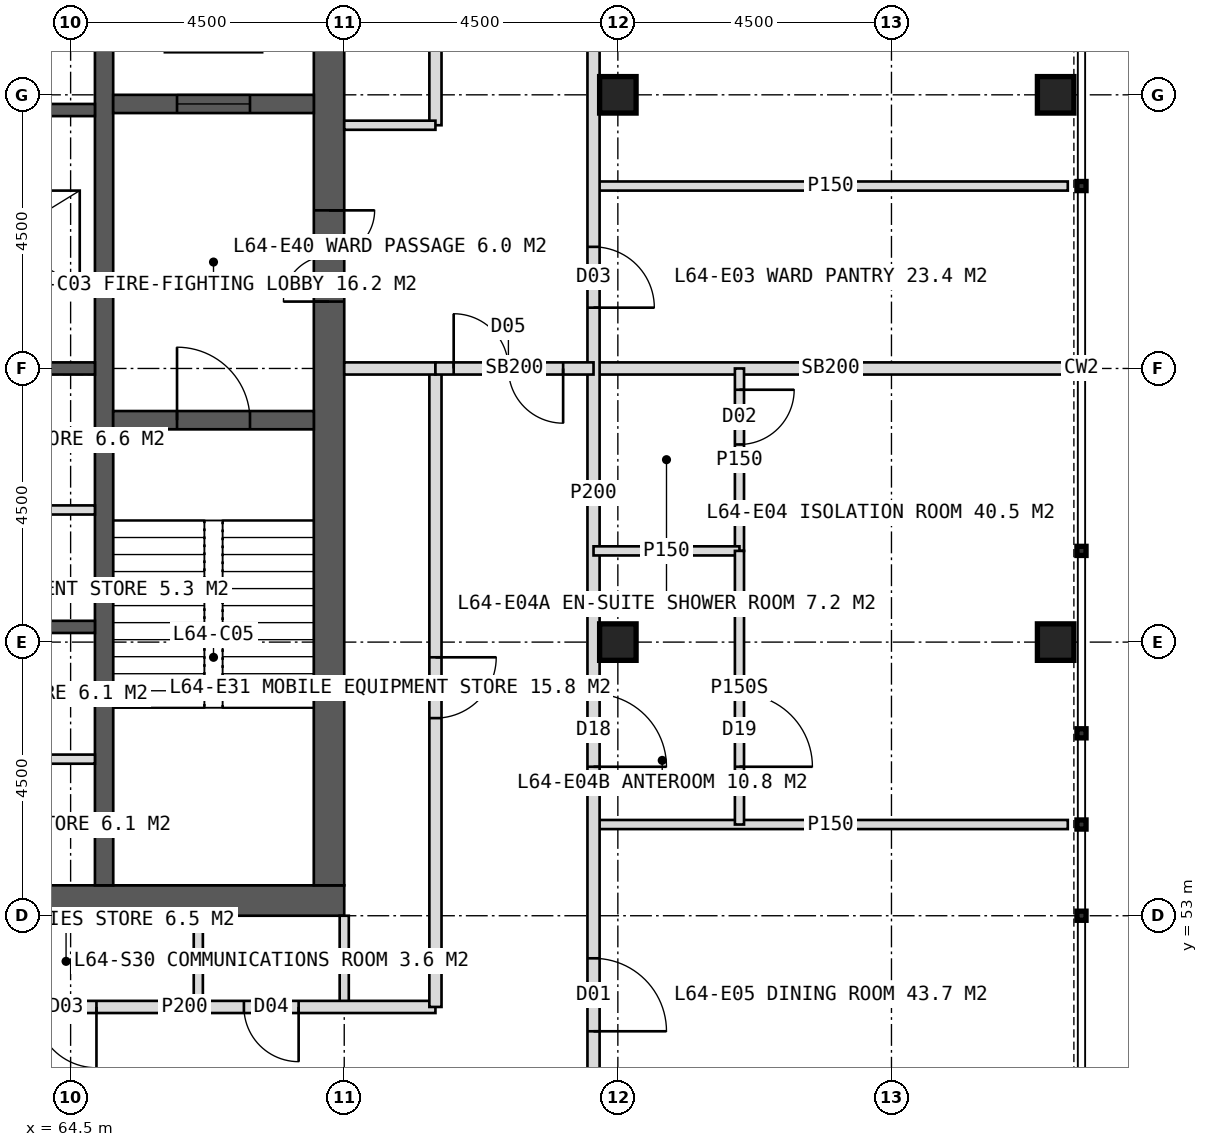
"""IFC4 building model, lengths in metres.
Left out: names, types, materials, properties, quantities, classifications, styles, units other than length and angle.
Written with IfcOpenShell. Run it as: python <this file> out.ifc"""

import sys

from ifc_helpers import new_model, si_unit, direction, frame, frame_2d, origin, origin_2d, place, context, subcontext, project, spatial, rectangle, hollow_rectangle, extrude, element, fill, save


model = new_model("IFC4")
c1 = context("Model", 3, precision=1e-05, world=origin(), true_north=direction((0.0, 1.0)))
c2 = subcontext(c1, "Body", "Model", "MODEL_VIEW")
j1 = project(units=[si_unit("LENGTHUNIT", "METRE"), si_unit("PLANEANGLEUNIT", "RADIAN")], contexts=[c1])
p1 = place(None, origin())
s1 = spatial("IfcSite", under=j1, at=p1, CompositionType="ELEMENT")
p2 = place(p1, origin())
s2 = spatial("IfcBuilding", under=s1, at=p2, CompositionType="ELEMENT")
p3 = place(p2, frame((0.0, 0.0, 266.0)))
s3 = spatial("IfcBuildingStorey", under=s2, at=p3, CompositionType="ELEMENT", Elevation=266.0)
p4 = place(p3, frame((51.0, 53.25, 0.0), z_axis=(0.0, 0.0, 1.0), x_axis=(1.0, 0.0, 0.0)))
e1 = element("IfcWall", 1, at=p4, inside=s3, PredefinedType="SHEAR", context=c2, shape_type="SweptSolid", body=[
    extrude(rectangle(XDim=18.0, YDim=0.5, at=frame_2d((9.0, 0.0))), origin(), (0.0, 0.0, 1.0), 4.0),
])
p5 = place(p4, frame((8.1, 0.0, 0.0)))
e2 = element("IfcOpeningElement", 2, at=p5, cuts=e1, PredefinedType="OPENING", context=c2, shape_type="SweptSolid", body=[
    extrude(rectangle(XDim=1.8, YDim=2.2, at=frame_2d((0.9, 1.1))), frame((0.0, 0.26, 0.0), z_axis=(0.0, -1.0, 0.0), x_axis=(1.0, 0.0, 0.0)), (0.0, 0.0, 1.0), 0.52),
])
p6 = place(p3, frame((68.75, 53.5, 0.0), z_axis=(0.0, 0.0, 1.0), x_axis=(0.0, 1.0, 0.0)))
e3 = element("IfcWall", 3, at=p6, inside=s3, PredefinedType="SHEAR", context=c2, shape_type="SweptSolid", body=[
    extrude(rectangle(XDim=17.0, YDim=0.5, at=frame_2d((8.5, 0.0))), origin(), (0.0, 0.0, 1.0), 4.0),
])
p7 = place(p6, frame((9.6, 0.0, 0.0)))
e4 = element("IfcOpeningElement", 4, at=p7, cuts=e3, PredefinedType="OPENING", context=c2, shape_type="SweptSolid", body=[
    extrude(rectangle(XDim=1.5, YDim=2.2, at=frame_2d((0.75, 1.1))), frame((0.0, 0.26, 0.0), z_axis=(0.0, -1.0, 0.0), x_axis=(1.0, 0.0, 0.0)), (0.0, 0.0, 1.0), 0.52),
])
p8 = place(p3, frame((65.05, 53.5, 0.0), z_axis=(0.0, 0.0, 1.0), x_axis=(0.0, 1.0, 0.0)))
e5 = element("IfcWall", 5, at=p8, inside=s3, PredefinedType="SHEAR", context=c2, shape_type="SweptSolid", body=[
    extrude(rectangle(XDim=17.0, YDim=0.3, at=frame_2d((8.5, 0.0))), origin(), (0.0, 0.0, 1.0), 4.0),
])
for number, where, z_axis, x_axis in (
    (6, (61.85, 57.75, 0.0), (0.0, 0.0, 1.0), (1.0, 0.0, 0.0)),
    (7, (61.85, 62.0, 0.0), (0.0, 0.0, 1.0), (1.0, 0.0, 0.0)),
    (8, (61.85, 66.25, 0.0), (0.0, 0.0, 1.0), (1.0, 0.0, 0.0)),
):
    element("IfcWall", number, at=place(p3, frame(where, z_axis=z_axis, x_axis=x_axis)), inside=s3, PredefinedType="SHEAR", context=c2, shape_type="SweptSolid", body=[
        extrude(rectangle(XDim=3.05, YDim=0.2, at=frame_2d((1.525, 0.0))), origin(), (0.0, 0.0, 1.0), 4.0),
    ])
p9 = place(p3, frame((65.2, 61.15, 0.0), z_axis=(0.0, 0.0, 1.0), x_axis=(1.0, 0.0, 0.0)))
e9 = element("IfcWall", 9, at=p9, inside=s3, PredefinedType="SHEAR", context=c2, shape_type="SweptSolid", body=[
    extrude(rectangle(XDim=3.3, YDim=0.3, at=frame_2d((1.65, 0.0))), origin(), (0.0, 0.0, 1.0), 4.0),
])
p10 = place(p9, frame((1.05, 0.0, 0.0)))
e10 = element("IfcOpeningElement", 10, at=p10, cuts=e9, PredefinedType="OPENING", context=c2, shape_type="SweptSolid", body=[
    extrude(rectangle(XDim=1.2, YDim=2.1, at=frame_2d((0.6, 1.05))), frame((0.0, 0.16, 0.0), z_axis=(0.0, -1.0, 0.0), x_axis=(1.0, 0.0, 0.0)), (0.0, 0.0, 1.0), 0.32),
])
p11 = place(p3, frame((65.2, 66.35, 0.0), z_axis=(0.0, 0.0, 1.0), x_axis=(1.0, 0.0, 0.0)))
e11 = element("IfcWall", 11, at=p11, inside=s3, PredefinedType="SHEAR", context=c2, shape_type="SweptSolid", body=[
    extrude(rectangle(XDim=3.3, YDim=0.3, at=frame_2d((1.65, 0.0))), origin(), (0.0, 0.0, 1.0), 4.0),
])
p12 = place(p11, frame((1.05, 0.0, 0.0)))
e12 = element("IfcOpeningElement", 12, at=p12, cuts=e11, PredefinedType="OPENING", context=c2, shape_type="SweptSolid", body=[
    extrude(rectangle(XDim=1.2, YDim=2.2, at=frame_2d((0.6, 1.1))), frame((0.0, 0.16, 0.0), z_axis=(0.0, -1.0, 0.0), x_axis=(1.0, 0.0, 0.0)), (0.0, 0.0, 1.0), 0.32),
])
for number, where, z_axis, x_axis in (
    (13, (73.5, 57.5, 0.0), (0.0, 0.0, 1.0), (1.0, 0.0, 0.0)),
    (14, (73.5, 66.5, 0.0), (0.0, 0.0, 1.0), (1.0, 0.0, 0.0)),
    (15, (80.7, 57.5, 0.0), (0.0, 0.0, 1.0), (1.0, 0.0, 0.0)),
    (16, (80.7, 66.5, 0.0), (0.0, 0.0, 1.0), (1.0, 0.0, 0.0)),
):
    element("IfcColumn", number, at=place(p3, frame(where, z_axis=z_axis, x_axis=x_axis)), inside=s3, PredefinedType="COLUMN", context=c2, shape_type="SweptSolid", body=[
        extrude(hollow_rectangle(XDim=0.6, YDim=0.6, WallThickness=0.04, at=origin_2d()), origin(), (0.0, 0.0, 1.0), 4.0),
    ])
p13 = place(p3, frame((69.0, 53.0, 0.0), z_axis=(0.0, 0.0, 1.0), x_axis=(0.0, -1.0, 0.0)))
e17 = element("IfcWall", 17, at=p13, inside=s3, PredefinedType="PARTITIONING", context=c2, shape_type="SweptSolid", body=[
    extrude(rectangle(XDim=1.5, YDim=0.15, at=frame_2d((0.75, 0.0))), origin(), (0.0, 0.0, 1.0), 3.75),
])
p14 = place(p3, frame((70.5, 51.5, 0.0), z_axis=(0.0, 0.0, 1.0), x_axis=(-1.0, 0.0, 0.0)))
e18 = element("IfcWall", 18, at=p14, inside=s3, PredefinedType="PARTITIONING", context=c2, shape_type="SweptSolid", body=[
    extrude(rectangle(XDim=8.25, YDim=0.2, at=frame_2d((4.125, 0.0))), origin(), (0.0, 0.0, 1.0), 3.75),
])
p15 = place(p14, frame((2.25, 0.0, 0.0)))
e19 = element("IfcOpeningElement", 19, at=p15, cuts=e18, PredefinedType="OPENING", context=c2, shape_type="SweptSolid", body=[
    extrude(rectangle(XDim=0.9, YDim=2.1, at=frame_2d((0.45, 1.05))), frame((0.0, 0.11, 0.0), z_axis=(0.0, -1.0, 0.0), x_axis=(1.0, 0.0, 0.0)), (0.0, 0.0, 1.0), 0.22),
])
p16 = place(p14, frame((5.575, 0.0, 0.0)))
e20 = element("IfcOpeningElement", 20, at=p16, cuts=e18, PredefinedType="OPENING", context=c2, shape_type="SweptSolid", body=[
    extrude(rectangle(XDim=1.0, YDim=2.1, at=frame_2d((0.5, 1.05))), frame((0.0, 0.11, 0.0), z_axis=(0.0, -1.0, 0.0), x_axis=(1.0, 0.0, 0.0)), (0.0, 0.0, 1.0), 0.22),
])
p17 = place(p3, frame((66.6, 53.0, 0.0), z_axis=(0.0, 0.0, 1.0), x_axis=(0.0, -1.0, 0.0)))
e21 = element("IfcWall", 21, at=p17, inside=s3, PredefinedType="PARTITIONING", context=c2, shape_type="SweptSolid", body=[
    extrude(rectangle(XDim=1.5, YDim=0.15, at=frame_2d((0.75, 0.0))), origin(), (0.0, 0.0, 1.0), 3.75),
])
p18 = place(p3, frame((73.1, 65.0, 0.0), z_axis=(0.0, 0.0, 1.0), x_axis=(1.0, 0.0, 0.0)))
e22 = element("IfcWall", 22, at=p18, inside=s3, PredefinedType="PARTITIONING", context=c2, shape_type="SweptSolid", body=[
    extrude(rectangle(XDim=7.8, YDim=0.15, at=frame_2d((3.9, 0.0))), origin(), (0.0, 0.0, 1.0), 3.75),
])
p19 = place(p3, frame((73.1, 62.0, 0.0), z_axis=(0.0, 0.0, 1.0), x_axis=(1.0, 0.0, 0.0)))
e23 = element("IfcWall", 23, at=p19, inside=s3, PredefinedType="SOLIDWALL", context=c2, shape_type="SweptSolid", body=[
    extrude(rectangle(XDim=7.8, YDim=0.2, at=frame_2d((3.9, 0.0))), origin(), (0.0, 0.0, 1.0), 2.75),
])
p20 = place(p3, frame((73.1, 54.5, 0.0), z_axis=(0.0, 0.0, 1.0), x_axis=(1.0, 0.0, 0.0)))
e24 = element("IfcWall", 24, at=p20, inside=s3, PredefinedType="PARTITIONING", context=c2, shape_type="SweptSolid", body=[
    extrude(rectangle(XDim=7.8, YDim=0.15, at=frame_2d((3.9, 0.0))), origin(), (0.0, 0.0, 1.0), 3.75),
])
p21 = place(p3, frame((73.1, 71.0, 0.0), z_axis=(0.0, 0.0, 1.0), x_axis=(0.0, -1.0, 0.0)))
e25 = element("IfcWall", 25, at=p21, inside=s3, PredefinedType="PARTITIONING", context=c2, shape_type="SweptSolid", body=[
    extrude(rectangle(XDim=22.1, YDim=0.2, at=frame_2d((11.05, 0.0))), origin(), (0.0, 0.0, 1.0), 3.75),
])
p22 = place(p21, frame((2.65, 0.0, 0.0)))
e26 = element("IfcOpeningElement", 26, at=p22, cuts=e25, PredefinedType="OPENING", context=c2, shape_type="SweptSolid", body=[
    extrude(rectangle(XDim=1.0, YDim=2.1, at=frame_2d((0.5, 1.05))), frame((0.0, 0.11, 0.0), z_axis=(0.0, -1.0, 0.0), x_axis=(1.0, 0.0, 0.0)), (0.0, 0.0, 1.0), 0.22),
])
p23 = place(p21, frame((7.0, 0.0, 0.0)))
e27 = element("IfcOpeningElement", 27, at=p23, cuts=e25, PredefinedType="OPENING", context=c2, shape_type="SweptSolid", body=[
    extrude(rectangle(XDim=1.0, YDim=2.1, at=frame_2d((0.5, 1.05))), frame((0.0, 0.11, 0.0), z_axis=(0.0, -1.0, 0.0), x_axis=(1.0, 0.0, 0.0)), (0.0, 0.0, 1.0), 0.22),
])
p24 = place(p21, frame((14.35, 0.0, 0.0)))
e28 = element("IfcOpeningElement", 28, at=p24, cuts=e25, PredefinedType="OPENING", context=c2, shape_type="SweptSolid", body=[
    extrude(rectangle(XDim=1.2, YDim=2.2, at=frame_2d((0.6, 1.1))), frame((0.0, 0.11, 0.0), z_axis=(0.0, -1.0, 0.0), x_axis=(1.0, 0.0, 0.0)), (0.0, 0.0, 1.0), 0.22),
])
p25 = place(p21, frame((18.7, 0.0, 0.0)))
e29 = element("IfcOpeningElement", 29, at=p25, cuts=e25, PredefinedType="OPENING", context=c2, shape_type="SweptSolid", body=[
    extrude(rectangle(XDim=1.2, YDim=2.2, at=frame_2d((0.6, 1.1))), frame((0.0, 0.11, 0.0), z_axis=(0.0, -1.0, 0.0), x_axis=(1.0, 0.0, 0.0)), (0.0, 0.0, 1.0), 0.22),
])
p26 = place(p3, frame((75.5, 62.0, 0.0), z_axis=(0.0, 0.0, 1.0), x_axis=(0.0, -1.0, 0.0)))
e30 = element("IfcWall", 30, at=p26, inside=s3, PredefinedType="PARTITIONING", context=c2, shape_type="SweptSolid", body=[
    extrude(rectangle(XDim=3.0, YDim=0.15, at=frame_2d((1.5, 0.0))), origin(), (0.0, 0.0, 1.0), 3.75),
])
p27 = place(p26, frame((0.35, 0.0, 0.0)))
e31 = element("IfcOpeningElement", 31, at=p27, cuts=e30, PredefinedType="OPENING", context=c2, shape_type="SweptSolid", body=[
    extrude(rectangle(XDim=0.9, YDim=2.1, at=frame_2d((0.45, 1.05))), frame((0.0, 0.085, 0.0), z_axis=(0.0, -1.0, 0.0), x_axis=(1.0, 0.0, 0.0)), (0.0, 0.0, 1.0), 0.17),
])
p28 = place(p3, frame((73.1, 59.0, 0.0), z_axis=(0.0, 0.0, 1.0), x_axis=(1.0, 0.0, 0.0)))
e32 = element("IfcWall", 32, at=p28, inside=s3, PredefinedType="PARTITIONING", context=c2, shape_type="SweptSolid", body=[
    extrude(rectangle(XDim=2.4, YDim=0.15, at=frame_2d((1.2, 0.0))), origin(), (0.0, 0.0, 1.0), 3.75),
])
p29 = place(p3, frame((75.5, 59.0, 0.0), z_axis=(0.0, 0.0, 1.0), x_axis=(0.0, -1.0, 0.0)))
e33 = element("IfcWall", 33, at=p29, inside=s3, PredefinedType="PARTITIONING", context=c2, shape_type="SweptSolid", body=[
    extrude(rectangle(XDim=4.5, YDim=0.15, at=frame_2d((2.25, 0.0))), origin(), (0.0, 0.0, 1.0), 3.75),
])
p30 = place(p29, frame((2.35, 0.0, 0.0)))
e34 = element("IfcOpeningElement", 34, at=p30, cuts=e33, PredefinedType="OPENING", context=c2, shape_type="SweptSolid", body=[
    extrude(rectangle(XDim=1.2, YDim=2.2, at=frame_2d((0.6, 1.1))), frame((0.0, 0.085, 0.0), z_axis=(0.0, -1.0, 0.0), x_axis=(1.0, 0.0, 0.0)), (0.0, 0.0, 1.0), 0.17),
])
p31 = place(p3, frame((70.5, 71.0, 0.0), z_axis=(0.0, 0.0, 1.0), x_axis=(0.0, -1.0, 0.0)))
e35 = element("IfcWall", 35, at=p31, inside=s3, PredefinedType="PARTITIONING", context=c2, shape_type="SweptSolid", body=[
    extrude(rectangle(XDim=5.0, YDim=0.2, at=frame_2d((2.5, 0.0))), origin(), (0.0, 0.0, 1.0), 3.75),
])
p32 = place(p31, frame((2.0, 0.0, 0.0)))
e36 = element("IfcOpeningElement", 36, at=p32, cuts=e35, PredefinedType="OPENING", context=c2, shape_type="SweptSolid", body=[
    extrude(rectangle(XDim=1.0, YDim=2.1, at=frame_2d((0.5, 1.05))), frame((0.0, 0.11, 0.0), z_axis=(0.0, -1.0, 0.0), x_axis=(1.0, 0.0, 0.0)), (0.0, 0.0, 1.0), 0.22),
])
p33 = place(p3, frame((70.5, 62.0, 0.0), z_axis=(0.0, 0.0, 1.0), x_axis=(0.0, -1.0, 0.0)))
e37 = element("IfcWall", 37, at=p33, inside=s3, PredefinedType="PARTITIONING", context=c2, shape_type="SweptSolid", body=[
    extrude(rectangle(XDim=10.5, YDim=0.2, at=frame_2d((5.25, 0.0))), origin(), (0.0, 0.0, 1.0), 3.75),
])
p34 = place(p33, frame((4.75, 0.0, 0.0)))
e38 = element("IfcOpeningElement", 38, at=p34, cuts=e37, PredefinedType="OPENING", context=c2, shape_type="SweptSolid", body=[
    extrude(rectangle(XDim=1.0, YDim=2.1, at=frame_2d((0.5, 1.05))), frame((0.0, 0.11, 0.0), z_axis=(0.0, -1.0, 0.0), x_axis=(1.0, 0.0, 0.0)), (0.0, 0.0, 1.0), 0.22),
])
p35 = place(p3, frame((69.0, 66.0, 0.0), z_axis=(0.0, 0.0, 1.0), x_axis=(1.0, 0.0, 0.0)))
e39 = element("IfcWall", 39, at=p35, inside=s3, PredefinedType="PARTITIONING", context=c2, shape_type="SweptSolid", body=[
    extrude(rectangle(XDim=1.5, YDim=0.15, at=frame_2d((0.75, 0.0))), origin(), (0.0, 0.0, 1.0), 3.75),
])
p36 = place(p3, frame((69.0, 62.0, 0.0), z_axis=(0.0, 0.0, 1.0), x_axis=(1.0, 0.0, 0.0)))
e40 = element("IfcWall", 40, at=p36, inside=s3, PredefinedType="SOLIDWALL", context=c2, shape_type="SweptSolid", body=[
    extrude(rectangle(XDim=1.5, YDim=0.2, at=frame_2d((0.75, 0.0))), origin(), (0.0, 0.0, 1.0), 2.75),
])
p37 = place(p3, frame((70.5, 62.0, 0.0), z_axis=(0.0, 0.0, 1.0), x_axis=(1.0, 0.0, 0.0)))
e41 = element("IfcWall", 41, at=p37, inside=s3, PredefinedType="SOLIDWALL", context=c2, shape_type="SweptSolid", body=[
    extrude(rectangle(XDim=2.6, YDim=0.2, at=frame_2d((1.3, 0.0))), origin(), (0.0, 0.0, 1.0), 2.75),
])
p38 = place(p37, frame((0.3, 0.0, 0.0)))
e42 = element("IfcOpeningElement", 42, at=p38, cuts=e41, PredefinedType="OPENING", context=c2, shape_type="SweptSolid", body=[
    extrude(rectangle(XDim=1.8, YDim=2.2, at=frame_2d((0.9, 1.1))), frame((0.0, 0.11, 0.0), z_axis=(0.0, -1.0, 0.0), x_axis=(1.0, 0.0, 0.0)), (0.0, 0.0, 1.0), 0.22),
])
for number, where, z_axis, x_axis in (
    (43, (61.85, 55.575, 0.0), (0.0, 0.0, 1.0), (1.0, 0.0, 0.0)),
    (44, (61.85, 59.673, 0.0), (0.0, 0.0, 1.0), (1.0, 0.0, 0.0)),
):
    element("IfcWall", number, at=place(p3, frame(where, z_axis=z_axis, x_axis=x_axis)), inside=s3, PredefinedType="PARTITIONING", context=c2, shape_type="SweptSolid", body=[
        extrude(rectangle(XDim=3.05, YDim=0.15, at=frame_2d((1.525, 0.0))), origin(), (0.0, 0.0, 1.0), 3.75),
    ])
p39 = place(p15, origin())
e45 = element("IfcDoor", 45, at=p39, inside=s3, OperationType="SINGLE_SWING_LEFT", PredefinedType="DOOR", context=c2, shape_type="SweptSolid", body=[
    extrude(rectangle(XDim=0.9, YDim=2.1, at=frame_2d((0.45, 1.05))), frame((0.0, 0.025, 0.0), z_axis=(0.0, -1.0, 0.0), x_axis=(1.0, 0.0, 0.0)), (0.0, 0.0, 1.0), 0.05),
])
fill(e19, e45)
p40 = place(p16, origin())
e46 = element("IfcDoor", 46, at=p40, inside=s3, OperationType="SINGLE_SWING_LEFT", PredefinedType="DOOR", context=c2, shape_type="SweptSolid", body=[
    extrude(rectangle(XDim=1.0, YDim=2.1, at=frame_2d((0.5, 1.05))), frame((0.0, 0.025, 0.0), z_axis=(0.0, -1.0, 0.0), x_axis=(1.0, 0.0, 0.0)), (0.0, 0.0, 1.0), 0.05),
])
fill(e20, e46)
p41 = place(p23, origin())
e47 = element("IfcDoor", 47, at=p41, inside=s3, OperationType="SINGLE_SWING_RIGHT", PredefinedType="DOOR", context=c2, shape_type="SweptSolid", body=[
    extrude(rectangle(XDim=1.0, YDim=2.1, at=frame_2d((0.5, 1.05))), frame((0.0, 0.025, 0.0), z_axis=(0.0, -1.0, 0.0), x_axis=(1.0, 0.0, 0.0)), (0.0, 0.0, 1.0), 0.05),
])
fill(e27, e47)
p42 = place(p30, origin())
e48 = element("IfcDoor", 48, at=p42, inside=s3, OperationType="SINGLE_SWING_RIGHT", PredefinedType="DOOR", context=c2, shape_type="SweptSolid", body=[
    extrude(rectangle(XDim=1.2, YDim=2.2, at=frame_2d((0.6, 1.1))), frame((0.0, 0.025, 0.0), z_axis=(0.0, -1.0, 0.0), x_axis=(1.0, 0.0, 0.0)), (0.0, 0.0, 1.0), 0.05),
])
fill(e34, e48)
p43 = place(p24, origin())
e49 = element("IfcDoor", 49, at=p43, inside=s3, OperationType="SINGLE_SWING_RIGHT", PredefinedType="DOOR", context=c2, shape_type="SweptSolid", body=[
    extrude(rectangle(XDim=1.2, YDim=2.2, at=frame_2d((0.6, 1.1))), frame((0.0, 0.025, 0.0), z_axis=(0.0, -1.0, 0.0), x_axis=(1.0, 0.0, 0.0)), (0.0, 0.0, 1.0), 0.05),
])
fill(e28, e49)
p44 = place(p27, origin())
e50 = element("IfcDoor", 50, at=p44, inside=s3, OperationType="SINGLE_SWING_LEFT", PredefinedType="DOOR", context=c2, shape_type="SweptSolid", body=[
    extrude(rectangle(XDim=0.9, YDim=2.1, at=frame_2d((0.45, 1.05))), frame((0.0, 0.025, 0.0), z_axis=(0.0, -1.0, 0.0), x_axis=(1.0, 0.0, 0.0)), (0.0, 0.0, 1.0), 0.05),
])
fill(e31, e50)
p45 = place(p25, origin())
e51 = element("IfcDoor", 51, at=p45, inside=s3, OperationType="SINGLE_SWING_RIGHT", PredefinedType="DOOR", context=c2, shape_type="SweptSolid", body=[
    extrude(rectangle(XDim=1.2, YDim=2.2, at=frame_2d((0.6, 1.1))), frame((0.0, 0.025, 0.0), z_axis=(0.0, -1.0, 0.0), x_axis=(1.0, 0.0, 0.0)), (0.0, 0.0, 1.0), 0.05),
])
fill(e29, e51)
p46 = place(p34, origin())
e52 = element("IfcDoor", 52, at=p46, inside=s3, OperationType="SINGLE_SWING_LEFT", PredefinedType="DOOR", context=c2, shape_type="SweptSolid", body=[
    extrude(rectangle(XDim=1.0, YDim=2.1, at=frame_2d((0.5, 1.05))), frame((0.0, 0.025, 0.0), z_axis=(0.0, -1.0, 0.0), x_axis=(1.0, 0.0, 0.0)), (0.0, 0.0, 1.0), 0.05),
])
fill(e38, e52)
p47 = place(p38, origin())
e53 = element("IfcDoor", 53, at=p47, inside=s3, OperationType="DOUBLE_DOOR_DOUBLE_SWING", PredefinedType="DOOR", context=c2, shape_type="SweptSolid", body=[
    extrude(rectangle(XDim=1.8, YDim=2.2, at=frame_2d((0.9, 1.1))), frame((0.0, 0.025, 0.0), z_axis=(0.0, -1.0, 0.0), x_axis=(1.0, 0.0, 0.0)), (0.0, 0.0, 1.0), 0.05),
])
fill(e42, e53)
p48 = place(p7, origin())
e54 = element("IfcDoor", 54, at=p48, inside=s3, OperationType="DOUBLE_DOOR_SINGLE_SWING", PredefinedType="DOOR", context=c2, shape_type="SweptSolid", body=[
    extrude(rectangle(XDim=1.5, YDim=2.2, at=frame_2d((0.75, 1.1))), frame((0.0, 0.025, 0.0), z_axis=(0.0, -1.0, 0.0), x_axis=(1.0, 0.0, 0.0)), (0.0, 0.0, 1.0), 0.05),
])
fill(e4, e54)
p49 = place(p10, origin())
e55 = element("IfcDoor", 55, at=p49, inside=s3, OperationType="SINGLE_SWING_LEFT", PredefinedType="DOOR", context=c2, shape_type="SweptSolid", body=[
    extrude(rectangle(XDim=1.2, YDim=2.1, at=frame_2d((0.6, 1.05))), frame((0.0, 0.025, 0.0), z_axis=(0.0, -1.0, 0.0), x_axis=(1.0, 0.0, 0.0)), (0.0, 0.0, 1.0), 0.05),
])
fill(e10, e55)
p50 = place(p12, origin())
e56 = element("IfcDoor", 56, at=p50, inside=s3, OperationType="SLIDING_TO_LEFT", PredefinedType="DOOR", context=c2, shape_type="SweptSolid", body=[
    extrude(rectangle(XDim=1.2, YDim=2.2, at=frame_2d((0.6, 1.1))), frame((0.0, 0.025, 0.0), z_axis=(0.0, -1.0, 0.0), x_axis=(1.0, 0.0, 0.0)), (0.0, 0.0, 1.0), 0.05),
])
fill(e12, e56)
save(model, sys.argv[1])
